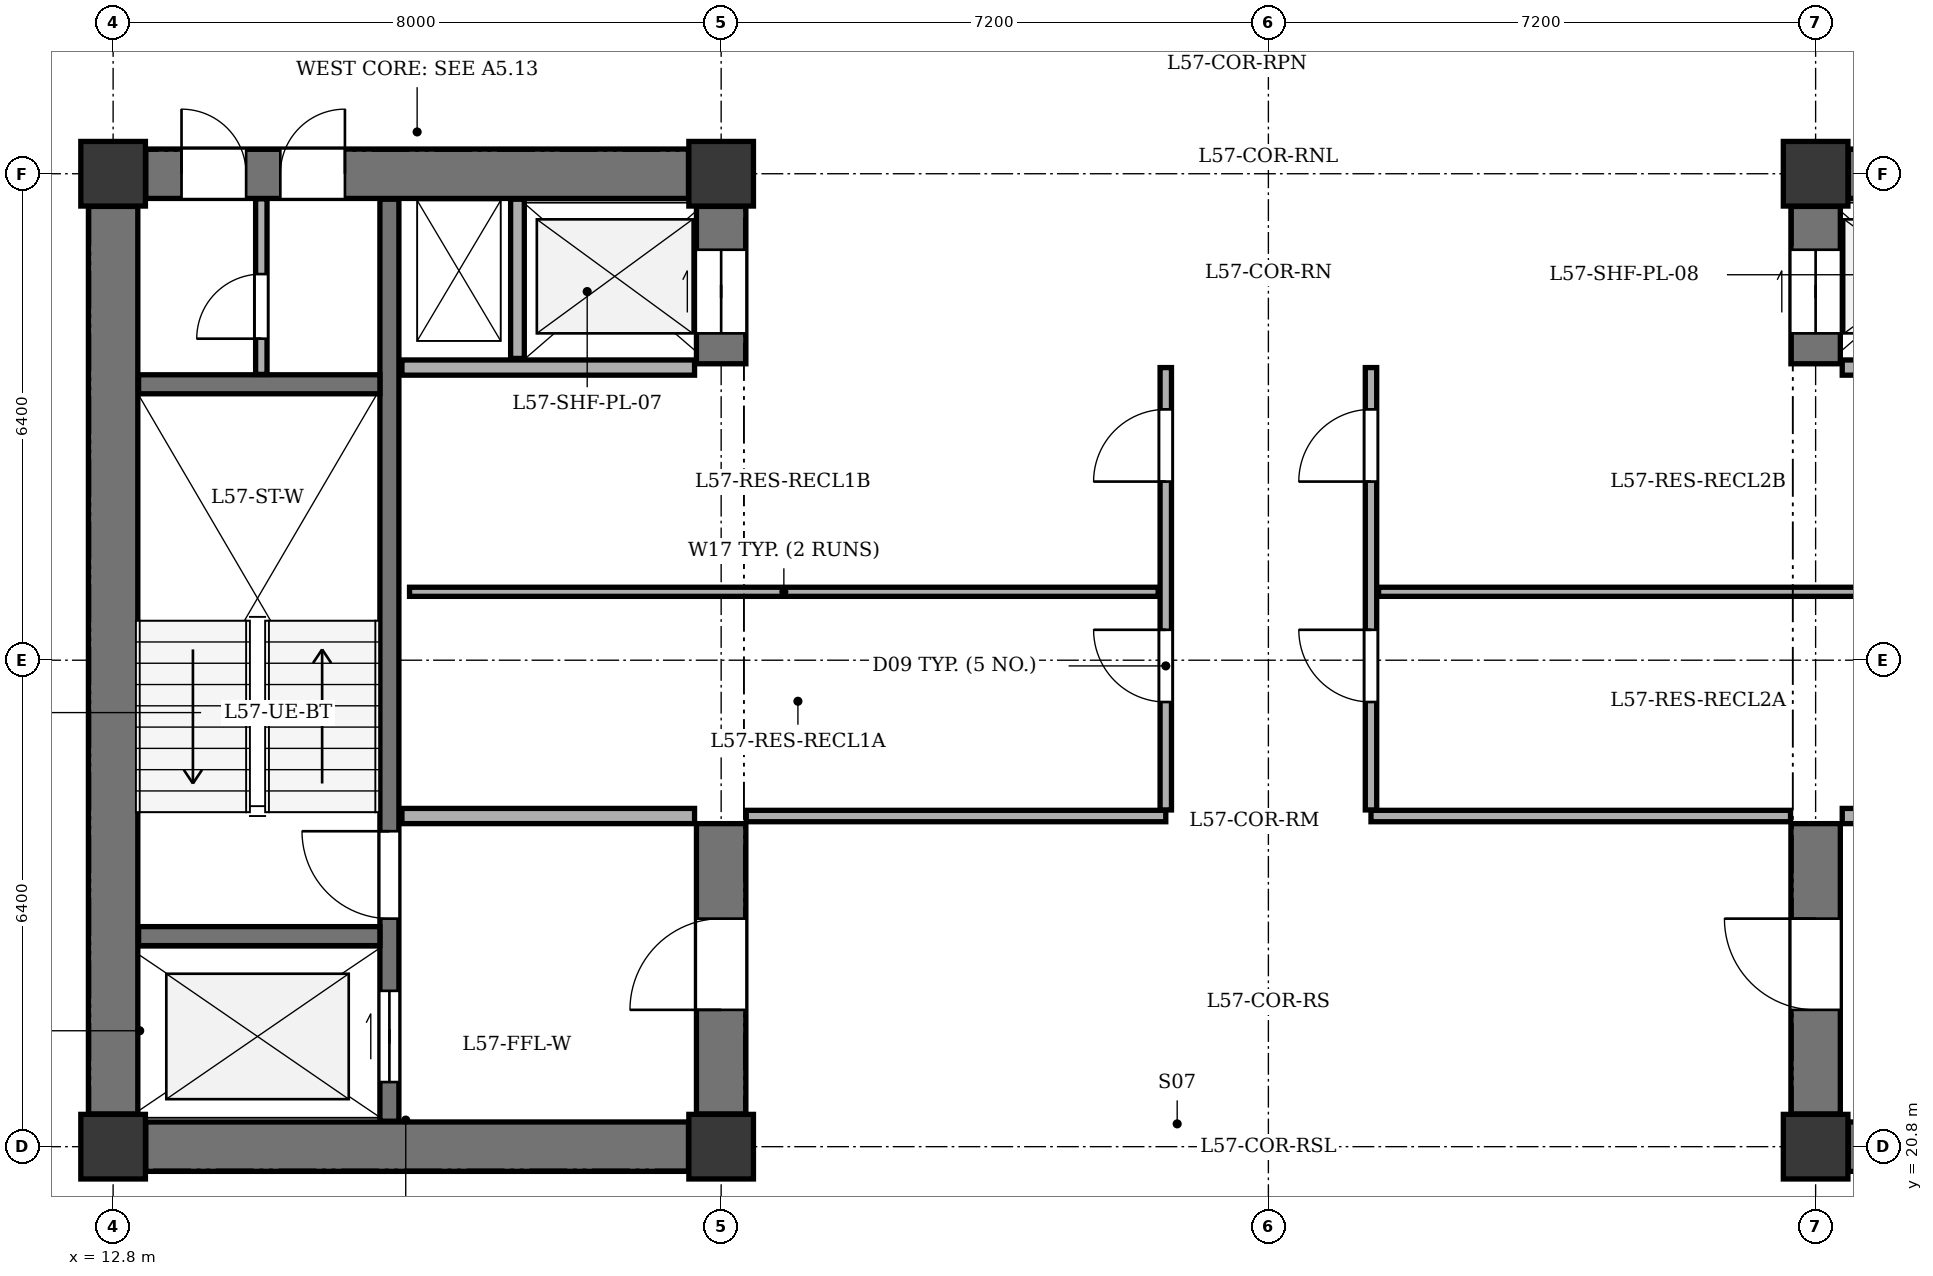
"""IFC4 building model, lengths in metres.
Left out: names, types, materials, properties, quantities, classifications, styles, units other than length and angle.
Written with IfcOpenShell. Run it as: python <this file> out.ifc"""

import sys

from ifc_helpers import new_model, si_unit, direction, frame, frame_2d, origin, origin_2d, place, context, subcontext, project, spatial, rectangle, extrude, element, fill, save


model = new_model("IFC4")
c1 = context("Model", 3, precision=1e-05, world=origin(), true_north=direction((0.0, 1.0)))
c2 = subcontext(c1, "Body", "Model", "MODEL_VIEW")
j1 = project(units=[si_unit("LENGTHUNIT", "METRE"), si_unit("PLANEANGLEUNIT", "RADIAN")], contexts=[c1])
p1 = place(None, origin())
s1 = spatial("IfcSite", under=j1, at=p1, CompositionType="ELEMENT")
p2 = place(p1, origin())
s2 = spatial("IfcBuilding", under=s1, at=p2, CompositionType="ELEMENT")
p3 = place(p2, frame((0.0, 0.0, 221.1)))
s3 = spatial("IfcBuildingStorey", under=s2, at=p3, CompositionType="ELEMENT", Elevation=221.1)
for number, where, z_axis, x_axis in (
    (1, (12.8, 20.8, 0.0), (0.0, 0.0, 1.0), (1.0, 0.0, 0.0)),
    (2, (20.8, 20.8, 0.0), (0.0, 0.0, 1.0), (1.0, 0.0, 0.0)),
    (3, (12.8, 33.6, 0.0), (0.0, 0.0, 1.0), (1.0, 0.0, 0.0)),
    (4, (20.8, 33.6, 0.0), (0.0, 0.0, 1.0), (1.0, 0.0, 0.0)),
    (5, (35.2, 20.8, 0.0), (0.0, 0.0, 1.0), (1.0, 0.0, 0.0)),
    (6, (35.2, 33.6, 0.0), (0.0, 0.0, 1.0), (1.0, 0.0, 0.0)),
):
    element("IfcColumn", number, at=place(p3, frame(where, z_axis=z_axis, x_axis=x_axis)), inside=s3, PredefinedType="COLUMN", context=c2, shape_type="SweptSolid", body=[
        extrude(rectangle(XDim=0.85, YDim=0.85, at=origin_2d()), origin(), (0.0, 0.0, 1.0), 3.4),
    ])
p4 = place(p3, frame((12.8, 21.23, 0.0), z_axis=(0.0, 0.0, 1.0), x_axis=(0.0, 1.0, 0.0)))
e7 = element("IfcWall", 7, at=p4, inside=s3, PredefinedType="SHEAR", context=c2, shape_type="SweptSolid", body=[
    extrude(rectangle(XDim=11.94, YDim=0.65, at=frame_2d((5.97, 0.0))), origin(), (0.0, 0.0, 1.0), 3.1),
])
p5 = place(p3, frame((13.23, 20.8, 0.0), z_axis=(0.0, 0.0, 1.0), x_axis=(1.0, 0.0, 0.0)))
e8 = element("IfcWall", 8, at=p5, inside=s3, PredefinedType="SHEAR", context=c2, shape_type="SweptSolid", body=[
    extrude(rectangle(XDim=7.14, YDim=0.65, at=frame_2d((3.57, 0.0))), origin(), (0.0, 0.0, 1.0), 3.1),
])
p6 = place(p3, frame((13.23, 33.6, 0.0), z_axis=(0.0, 0.0, 1.0), x_axis=(1.0, 0.0, 0.0)))
e9 = element("IfcWall", 9, at=p6, inside=s3, PredefinedType="SHEAR", context=c2, shape_type="SweptSolid", body=[
    extrude(rectangle(XDim=7.14, YDim=0.65, at=frame_2d((3.57, 0.0))), origin(), (0.0, 0.0, 1.0), 3.1),
])
p7 = place(p6, frame((0.47, 0.0, 0.0)))
e10 = element("IfcOpeningElement", 10, at=p7, cuts=e9, PredefinedType="OPENING", context=c2, shape_type="SweptSolid", body=[
    extrude(rectangle(XDim=0.85, YDim=2.02, at=frame_2d((0.425, 1.01))), frame((0.0, 0.335, 0.0), z_axis=(0.0, -1.0, 0.0), x_axis=(1.0, 0.0, 0.0)), (0.0, 0.0, 1.0), 0.67),
])
p8 = place(p6, frame((1.77, 0.0, 0.0)))
e11 = element("IfcOpeningElement", 11, at=p8, cuts=e9, PredefinedType="OPENING", context=c2, shape_type="SweptSolid", body=[
    extrude(rectangle(XDim=0.85, YDim=2.02, at=frame_2d((0.425, 1.01))), frame((0.0, 0.335, 0.0), z_axis=(0.0, -1.0, 0.0), x_axis=(1.0, 0.0, 0.0)), (0.0, 0.0, 1.0), 0.67),
])
p9 = place(p3, frame((20.8, 21.23, 0.0), z_axis=(0.0, 0.0, 1.0), x_axis=(0.0, 1.0, 0.0)))
e12 = element("IfcWall", 12, at=p9, inside=s3, PredefinedType="SHEAR", context=c2, shape_type="SweptSolid", body=[
    extrude(rectangle(XDim=3.82, YDim=0.65, at=frame_2d((1.91, 0.0))), origin(), (0.0, 0.0, 1.0), 3.1),
])
p10 = place(p9, frame((1.37, 0.0, 0.0)))
e13 = element("IfcOpeningElement", 13, at=p10, cuts=e12, PredefinedType="OPENING", context=c2, shape_type="SweptSolid", body=[
    extrude(rectangle(XDim=1.2, YDim=2.15, at=frame_2d((0.6, 1.075))), frame((0.0, 0.335, 0.0), z_axis=(0.0, -1.0, 0.0), x_axis=(1.0, 0.0, 0.0)), (0.0, 0.0, 1.0), 0.67),
])
p11 = place(p3, frame((20.8, 31.1, 0.0), z_axis=(0.0, 0.0, 1.0), x_axis=(0.0, 1.0, 0.0)))
e14 = element("IfcWall", 14, at=p11, inside=s3, PredefinedType="SHEAR", context=c2, shape_type="SweptSolid", body=[
    extrude(rectangle(XDim=2.07, YDim=0.65, at=frame_2d((1.035, 0.0))), origin(), (0.0, 0.0, 1.0), 3.1),
])
p12 = place(p11, frame((0.4, 0.0, 0.0)))
e15 = element("IfcOpeningElement", 15, at=p12, cuts=e14, PredefinedType="OPENING", context=c2, shape_type="SweptSolid", body=[
    extrude(rectangle(XDim=1.1, YDim=2.1, at=frame_2d((0.55, 1.05))), frame((0.0, 0.335, 0.0), z_axis=(0.0, -1.0, 0.0), x_axis=(1.0, 0.0, 0.0)), (0.0, 0.0, 1.0), 0.67),
])
p13 = place(p3, frame((16.435, 21.135, 0.0), z_axis=(0.0, 0.0, 1.0), x_axis=(0.0, 1.0, 0.0)))
e16 = element("IfcWall", 16, at=p13, inside=s3, PredefinedType="SHEAR", context=c2, shape_type="SweptSolid", body=[
    extrude(rectangle(XDim=12.13, YDim=0.25, at=frame_2d((6.065, 0.0))), origin(), (0.0, 0.0, 1.0), 3.1),
])
p14 = place(p13, frame((0.515, 0.0, 0.0)))
e17 = element("IfcOpeningElement", 17, at=p14, cuts=e16, PredefinedType="OPENING", context=c2, shape_type="SweptSolid", body=[
    extrude(rectangle(XDim=1.2, YDim=2.15, at=frame_2d((0.6, 1.075))), frame((0.0, 0.135, 0.0), z_axis=(0.0, -1.0, 0.0), x_axis=(1.0, 0.0, 0.0)), (0.0, 0.0, 1.0), 0.27),
])
p15 = place(p13, frame((2.665, 0.0, 0.0)))
e18 = element("IfcOpeningElement", 18, at=p15, cuts=e16, PredefinedType="OPENING", context=c2, shape_type="SweptSolid", body=[
    extrude(rectangle(XDim=1.15, YDim=2.15, at=frame_2d((0.575, 1.075))), frame((0.0, 0.135, 0.0), z_axis=(0.0, -1.0, 0.0), x_axis=(1.0, 0.0, 0.0)), (0.0, 0.0, 1.0), 0.27),
])
for number, where, z_axis, x_axis in (
    (19, (13.135, 23.57, 0.0), (0.0, 0.0, 1.0), (1.0, 0.0, 0.0)),
    (20, (13.135, 30.83, 0.0), (0.0, 0.0, 1.0), (1.0, 0.0, 0.0)),
):
    element("IfcWall", number, at=place(p3, frame(where, z_axis=z_axis, x_axis=x_axis)), inside=s3, PredefinedType="SHEAR", context=c2, shape_type="SweptSolid", body=[
        extrude(rectangle(XDim=3.175, YDim=0.25, at=frame_2d((1.587, 0.0))), origin(), (0.0, 0.0, 1.0), 3.1),
    ])
for number, where, z_axis, x_axis in (
    (21, (16.6, 25.15, 0.0), (0.0, 0.0, 1.0), (1.0, 0.0, 0.0)),
    (22, (16.6, 31.05, 0.0), (0.0, 0.0, 1.0), (1.0, 0.0, 0.0)),
):
    element("IfcWall", number, at=place(p3, frame(where, z_axis=z_axis, x_axis=x_axis)), inside=s3, PredefinedType="SOLIDWALL", context=c2, shape_type="SweptSolid", body=[
        extrude(rectangle(XDim=3.85, YDim=0.2, at=frame_2d((1.925, 0.0))), origin(), (0.0, 0.0, 1.0), 3.1),
    ])
p16 = place(p3, frame((18.12, 31.17, 0.0), z_axis=(0.0, 0.0, 1.0), x_axis=(0.0, 1.0, 0.0)))
e23 = element("IfcWall", 23, at=p16, inside=s3, PredefinedType="PARTITIONING", context=c2, shape_type="SweptSolid", body=[
    extrude(rectangle(XDim=2.095, YDim=0.18, at=frame_2d((1.047, 0.0))), origin(), (0.0, 0.0, 1.0), 3.1),
])
p17 = place(p3, frame((35.63, 20.8, 0.0), z_axis=(0.0, 0.0, 1.0), x_axis=(1.0, 0.0, 0.0)))
e24 = element("IfcWall", 24, at=p17, inside=s3, PredefinedType="SHEAR", context=c2, shape_type="SweptSolid", body=[
    extrude(rectangle(XDim=7.14, YDim=0.65, at=frame_2d((3.57, 0.0))), origin(), (0.0, 0.0, 1.0), 3.1),
])
p18 = place(p3, frame((35.63, 33.6, 0.0), z_axis=(0.0, 0.0, 1.0), x_axis=(1.0, 0.0, 0.0)))
e25 = element("IfcWall", 25, at=p18, inside=s3, PredefinedType="SHEAR", context=c2, shape_type="SweptSolid", body=[
    extrude(rectangle(XDim=7.14, YDim=0.65, at=frame_2d((3.57, 0.0))), origin(), (0.0, 0.0, 1.0), 3.1),
])
p19 = place(p18, frame((4.77, 0.0, 0.0)))
e26 = element("IfcOpeningElement", 26, at=p19, cuts=e25, PredefinedType="OPENING", context=c2, shape_type="SweptSolid", body=[
    extrude(rectangle(XDim=1.3, YDim=2.15, at=frame_2d((0.65, 1.075))), frame((0.0, 0.335, 0.0), z_axis=(0.0, -1.0, 0.0), x_axis=(1.0, 0.0, 0.0)), (0.0, 0.0, 1.0), 0.67),
])
p20 = place(p18, frame((2.57, 0.0, 0.0)))
e27 = element("IfcOpeningElement", 27, at=p20, cuts=e25, PredefinedType="OPENING", context=c2, shape_type="SweptSolid", body=[
    extrude(rectangle(XDim=0.85, YDim=2.02, at=frame_2d((0.425, 1.01))), frame((0.0, 0.335, 0.0), z_axis=(0.0, -1.0, 0.0), x_axis=(1.0, 0.0, 0.0)), (0.0, 0.0, 1.0), 0.67),
])
p21 = place(p3, frame((35.2, 21.23, 0.0), z_axis=(0.0, 0.0, 1.0), x_axis=(0.0, 1.0, 0.0)))
e28 = element("IfcWall", 28, at=p21, inside=s3, PredefinedType="SHEAR", context=c2, shape_type="SweptSolid", body=[
    extrude(rectangle(XDim=3.82, YDim=0.65, at=frame_2d((1.91, 0.0))), origin(), (0.0, 0.0, 1.0), 3.1),
])
p22 = place(p21, frame((1.37, 0.0, 0.0)))
e29 = element("IfcOpeningElement", 29, at=p22, cuts=e28, PredefinedType="OPENING", context=c2, shape_type="SweptSolid", body=[
    extrude(rectangle(XDim=1.2, YDim=2.15, at=frame_2d((0.6, 1.075))), frame((0.0, 0.335, 0.0), z_axis=(0.0, -1.0, 0.0), x_axis=(1.0, 0.0, 0.0)), (0.0, 0.0, 1.0), 0.67),
])
p23 = place(p3, frame((35.2, 31.1, 0.0), z_axis=(0.0, 0.0, 1.0), x_axis=(0.0, 1.0, 0.0)))
e30 = element("IfcWall", 30, at=p23, inside=s3, PredefinedType="SHEAR", context=c2, shape_type="SweptSolid", body=[
    extrude(rectangle(XDim=2.07, YDim=0.65, at=frame_2d((1.035, 0.0))), origin(), (0.0, 0.0, 1.0), 3.1),
])
p24 = place(p23, frame((0.4, 0.0, 0.0)))
e31 = element("IfcOpeningElement", 31, at=p24, cuts=e30, PredefinedType="OPENING", context=c2, shape_type="SweptSolid", body=[
    extrude(rectangle(XDim=1.1, YDim=2.1, at=frame_2d((0.55, 1.05))), frame((0.0, 0.335, 0.0), z_axis=(0.0, -1.0, 0.0), x_axis=(1.0, 0.0, 0.0)), (0.0, 0.0, 1.0), 0.67),
])
p25 = place(p3, frame((35.55, 25.15, 0.0), z_axis=(0.0, 0.0, 1.0), x_axis=(1.0, 0.0, 0.0)))
e32 = element("IfcWall", 32, at=p25, inside=s3, PredefinedType="SOLIDWALL", context=c2, shape_type="SweptSolid", body=[
    extrude(rectangle(XDim=3.85, YDim=0.2, at=frame_2d((1.925, 0.0))), origin(), (0.0, 0.0, 1.0), 3.1),
])
p26 = place(p3, frame((35.55, 31.05, 0.0), z_axis=(0.0, 0.0, 1.0), x_axis=(1.0, 0.0, 0.0)))
e33 = element("IfcWall", 33, at=p26, inside=s3, PredefinedType="SOLIDWALL", context=c2, shape_type="SweptSolid", body=[
    extrude(rectangle(XDim=2.25, YDim=0.2, at=frame_2d((1.125, 0.0))), origin(), (0.0, 0.0, 1.0), 3.1),
])
p27 = place(p3, frame((14.75, 30.96, 0.0), z_axis=(0.0, 0.0, 1.0), x_axis=(0.0, 1.0, 0.0)))
e34 = element("IfcWall", 34, at=p27, inside=s3, PredefinedType="PARTITIONING", context=c2, shape_type="SweptSolid", body=[
    extrude(rectangle(XDim=2.31, YDim=0.15, at=frame_2d((1.155, 0.0))), origin(), (0.0, 0.0, 1.0), 3.1),
])
p28 = place(p27, frame((0.47, 0.0, 0.0)))
e35 = element("IfcOpeningElement", 35, at=p28, cuts=e34, PredefinedType="OPENING", context=c2, shape_type="SweptSolid", body=[
    extrude(rectangle(XDim=0.85, YDim=2.02, at=frame_2d((0.425, 1.01))), frame((0.0, 0.085, 0.0), z_axis=(0.0, -1.0, 0.0), x_axis=(1.0, 0.0, 0.0)), (0.0, 0.0, 1.0), 0.17),
])
for number, where, z_axis, x_axis in (
    (36, (21.13, 25.15, 0.0), (0.0, 0.0, 1.0), (1.0, 0.0, 0.0)),
    (37, (29.35, 25.15, 0.0), (0.0, 0.0, 1.0), (1.0, 0.0, 0.0)),
):
    element("IfcWall", number, at=place(p3, frame(where, z_axis=z_axis, x_axis=x_axis)), inside=s3, PredefinedType="PARTITIONING", context=c2, shape_type="SweptSolid", body=[
        extrude(rectangle(XDim=5.52, YDim=0.15, at=frame_2d((2.76, 0.0))), origin(), (0.0, 0.0, 1.0), 3.1),
    ])
p29 = place(p3, frame((26.65, 25.23, 0.0), z_axis=(0.0, 0.0, 1.0), x_axis=(0.0, 1.0, 0.0)))
e38 = element("IfcWall", 38, at=p29, inside=s3, PredefinedType="PARTITIONING", context=c2, shape_type="SweptSolid", body=[
    extrude(rectangle(XDim=5.82, YDim=0.15, at=frame_2d((2.91, 0.0))), origin(), (0.0, 0.0, 1.0), 3.1),
])
p30 = place(p29, frame((1.42, 0.0, 0.0)))
e39 = element("IfcOpeningElement", 39, at=p30, cuts=e38, PredefinedType="OPENING", context=c2, shape_type="SweptSolid", body=[
    extrude(rectangle(XDim=0.95, YDim=2.1, at=frame_2d((0.475, 1.05))), frame((0.0, 0.085, 0.0), z_axis=(0.0, -1.0, 0.0), x_axis=(1.0, 0.0, 0.0)), (0.0, 0.0, 1.0), 0.17),
])
p31 = place(p29, frame((4.32, 0.0, 0.0)))
e40 = element("IfcOpeningElement", 40, at=p31, cuts=e38, PredefinedType="OPENING", context=c2, shape_type="SweptSolid", body=[
    extrude(rectangle(XDim=0.95, YDim=2.1, at=frame_2d((0.475, 1.05))), frame((0.0, 0.085, 0.0), z_axis=(0.0, -1.0, 0.0), x_axis=(1.0, 0.0, 0.0)), (0.0, 0.0, 1.0), 0.17),
])
p32 = place(p3, frame((16.7, 28.1, 0.0), z_axis=(0.0, 0.0, 1.0), x_axis=(1.0, 0.0, 0.0)))
e41 = element("IfcWall", 41, at=p32, inside=s3, PredefinedType="PARTITIONING", context=c2, shape_type="SweptSolid", body=[
    extrude(rectangle(XDim=9.85, YDim=0.12, at=frame_2d((4.925, 0.0))), origin(), (0.0, 0.0, 1.0), 3.1),
])
p33 = place(p3, frame((29.35, 25.23, 0.0), z_axis=(0.0, 0.0, 1.0), x_axis=(0.0, 1.0, 0.0)))
e42 = element("IfcWall", 42, at=p33, inside=s3, PredefinedType="PARTITIONING", context=c2, shape_type="SweptSolid", body=[
    extrude(rectangle(XDim=5.82, YDim=0.15, at=frame_2d((2.91, 0.0))), origin(), (0.0, 0.0, 1.0), 3.1),
])
p34 = place(p33, frame((1.42, 0.0, 0.0)))
e43 = element("IfcOpeningElement", 43, at=p34, cuts=e42, PredefinedType="OPENING", context=c2, shape_type="SweptSolid", body=[
    extrude(rectangle(XDim=0.95, YDim=2.1, at=frame_2d((0.475, 1.05))), frame((0.0, 0.085, 0.0), z_axis=(0.0, -1.0, 0.0), x_axis=(1.0, 0.0, 0.0)), (0.0, 0.0, 1.0), 0.17),
])
p35 = place(p33, frame((4.32, 0.0, 0.0)))
e44 = element("IfcOpeningElement", 44, at=p35, cuts=e42, PredefinedType="OPENING", context=c2, shape_type="SweptSolid", body=[
    extrude(rectangle(XDim=0.95, YDim=2.1, at=frame_2d((0.475, 1.05))), frame((0.0, 0.085, 0.0), z_axis=(0.0, -1.0, 0.0), x_axis=(1.0, 0.0, 0.0)), (0.0, 0.0, 1.0), 0.17),
])
p36 = place(p3, frame((29.45, 28.1, 0.0), z_axis=(0.0, 0.0, 1.0), x_axis=(1.0, 0.0, 0.0)))
e45 = element("IfcWall", 45, at=p36, inside=s3, PredefinedType="PARTITIONING", context=c2, shape_type="SweptSolid", body=[
    extrude(rectangle(XDim=8.345, YDim=0.12, at=frame_2d((4.172, 0.0))), origin(), (0.0, 0.0, 1.0), 3.1),
])
p37 = place(p7, origin())
e46 = element("IfcDoor", 46, at=p37, inside=s3, OperationType="SINGLE_SWING_LEFT", PredefinedType="DOOR", context=c2, shape_type="SweptSolid", body=[
    extrude(rectangle(XDim=0.85, YDim=2.02, at=frame_2d((0.425, 1.01))), frame((0.0, 0.025, 0.0), z_axis=(0.0, -1.0, 0.0), x_axis=(1.0, 0.0, 0.0)), (0.0, 0.0, 1.0), 0.05),
])
fill(e10, e46)
p38 = place(p8, origin())
e47 = element("IfcDoor", 47, at=p38, inside=s3, OperationType="SINGLE_SWING_RIGHT", PredefinedType="DOOR", context=c2, shape_type="SweptSolid", body=[
    extrude(rectangle(XDim=0.85, YDim=2.02, at=frame_2d((0.425, 1.01))), frame((0.0, 0.025, 0.0), z_axis=(0.0, -1.0, 0.0), x_axis=(1.0, 0.0, 0.0)), (0.0, 0.0, 1.0), 0.05),
])
fill(e11, e47)
p39 = place(p10, origin())
e48 = element("IfcDoor", 48, at=p39, inside=s3, OperationType="SINGLE_SWING_LEFT", PredefinedType="DOOR", context=c2, shape_type="SweptSolid", body=[
    extrude(rectangle(XDim=1.2, YDim=2.15, at=frame_2d((0.6, 1.075))), frame((0.0, 0.025, 0.0), z_axis=(0.0, -1.0, 0.0), x_axis=(1.0, 0.0, 0.0)), (0.0, 0.0, 1.0), 0.05),
])
fill(e13, e48)
p40 = place(p12, origin())
e49 = element("IfcDoor", 49, at=p40, inside=s3, OperationType="DOUBLE_DOOR_SLIDING", PredefinedType="DOOR", context=c2, shape_type="SweptSolid", body=[
    extrude(rectangle(XDim=1.1, YDim=2.1, at=frame_2d((0.55, 1.05))), frame((0.0, 0.025, 0.0), z_axis=(0.0, -1.0, 0.0), x_axis=(1.0, 0.0, 0.0)), (0.0, 0.0, 1.0), 0.05),
])
fill(e15, e49)
p41 = place(p14, origin())
e50 = element("IfcDoor", 50, at=p41, inside=s3, OperationType="DOUBLE_DOOR_SLIDING", PredefinedType="DOOR", context=c2, shape_type="SweptSolid", body=[
    extrude(rectangle(XDim=1.2, YDim=2.15, at=frame_2d((0.6, 1.075))), frame((0.0, 0.025, 0.0), z_axis=(0.0, -1.0, 0.0), x_axis=(1.0, 0.0, 0.0)), (0.0, 0.0, 1.0), 0.05),
])
fill(e17, e50)
p42 = place(p15, origin())
e51 = element("IfcDoor", 51, at=p42, inside=s3, OperationType="SINGLE_SWING_RIGHT", PredefinedType="DOOR", context=c2, shape_type="SweptSolid", body=[
    extrude(rectangle(XDim=1.15, YDim=2.15, at=frame_2d((0.575, 1.075))), frame((0.0, 0.025, 0.0), z_axis=(0.0, -1.0, 0.0), x_axis=(1.0, 0.0, 0.0)), (0.0, 0.0, 1.0), 0.05),
])
fill(e18, e51)
p43 = place(p22, origin())
e52 = element("IfcDoor", 52, at=p43, inside=s3, OperationType="SINGLE_SWING_RIGHT", PredefinedType="DOOR", context=c2, shape_type="SweptSolid", body=[
    extrude(rectangle(XDim=1.2, YDim=2.15, at=frame_2d((0.6, 1.075))), frame((0.0, 0.025, 0.0), z_axis=(0.0, -1.0, 0.0), x_axis=(1.0, 0.0, 0.0)), (0.0, 0.0, 1.0), 0.05),
])
fill(e29, e52)
p44 = place(p24, origin())
e53 = element("IfcDoor", 53, at=p44, inside=s3, OperationType="DOUBLE_DOOR_SLIDING", PredefinedType="DOOR", context=c2, shape_type="SweptSolid", body=[
    extrude(rectangle(XDim=1.1, YDim=2.1, at=frame_2d((0.55, 1.05))), frame((0.0, 0.025, 0.0), z_axis=(0.0, -1.0, 0.0), x_axis=(1.0, 0.0, 0.0)), (0.0, 0.0, 1.0), 0.05),
])
fill(e31, e53)
p45 = place(p28, origin())
e54 = element("IfcDoor", 54, at=p45, inside=s3, OperationType="SINGLE_SWING_LEFT", PredefinedType="DOOR", context=c2, shape_type="SweptSolid", body=[
    extrude(rectangle(XDim=0.85, YDim=2.02, at=frame_2d((0.425, 1.01))), frame((0.0, 0.025, 0.0), z_axis=(0.0, -1.0, 0.0), x_axis=(1.0, 0.0, 0.0)), (0.0, 0.0, 1.0), 0.05),
])
fill(e35, e54)
p46 = place(p30, origin())
e55 = element("IfcDoor", 55, at=p46, inside=s3, OperationType="SINGLE_SWING_RIGHT", PredefinedType="DOOR", context=c2, shape_type="SweptSolid", body=[
    extrude(rectangle(XDim=0.95, YDim=2.1, at=frame_2d((0.475, 1.05))), frame((0.0, 0.025, 0.0), z_axis=(0.0, -1.0, 0.0), x_axis=(1.0, 0.0, 0.0)), (0.0, 0.0, 1.0), 0.05),
])
fill(e39, e55)
p47 = place(p31, origin())
e56 = element("IfcDoor", 56, at=p47, inside=s3, OperationType="SINGLE_SWING_LEFT", PredefinedType="DOOR", context=c2, shape_type="SweptSolid", body=[
    extrude(rectangle(XDim=0.95, YDim=2.1, at=frame_2d((0.475, 1.05))), frame((0.0, 0.025, 0.0), z_axis=(0.0, -1.0, 0.0), x_axis=(1.0, 0.0, 0.0)), (0.0, 0.0, 1.0), 0.05),
])
fill(e40, e56)
p48 = place(p34, origin())
e57 = element("IfcDoor", 57, at=p48, inside=s3, OperationType="SINGLE_SWING_RIGHT", PredefinedType="DOOR", context=c2, shape_type="SweptSolid", body=[
    extrude(rectangle(XDim=0.95, YDim=2.1, at=frame_2d((0.475, 1.05))), frame((0.0, 0.025, 0.0), z_axis=(0.0, -1.0, 0.0), x_axis=(1.0, 0.0, 0.0)), (0.0, 0.0, 1.0), 0.05),
])
fill(e43, e57)
p49 = place(p35, origin())
e58 = element("IfcDoor", 58, at=p49, inside=s3, OperationType="SINGLE_SWING_LEFT", PredefinedType="DOOR", context=c2, shape_type="SweptSolid", body=[
    extrude(rectangle(XDim=0.95, YDim=2.1, at=frame_2d((0.475, 1.05))), frame((0.0, 0.025, 0.0), z_axis=(0.0, -1.0, 0.0), x_axis=(1.0, 0.0, 0.0)), (0.0, 0.0, 1.0), 0.05),
])
fill(e44, e58)
save(model, sys.argv[1])
